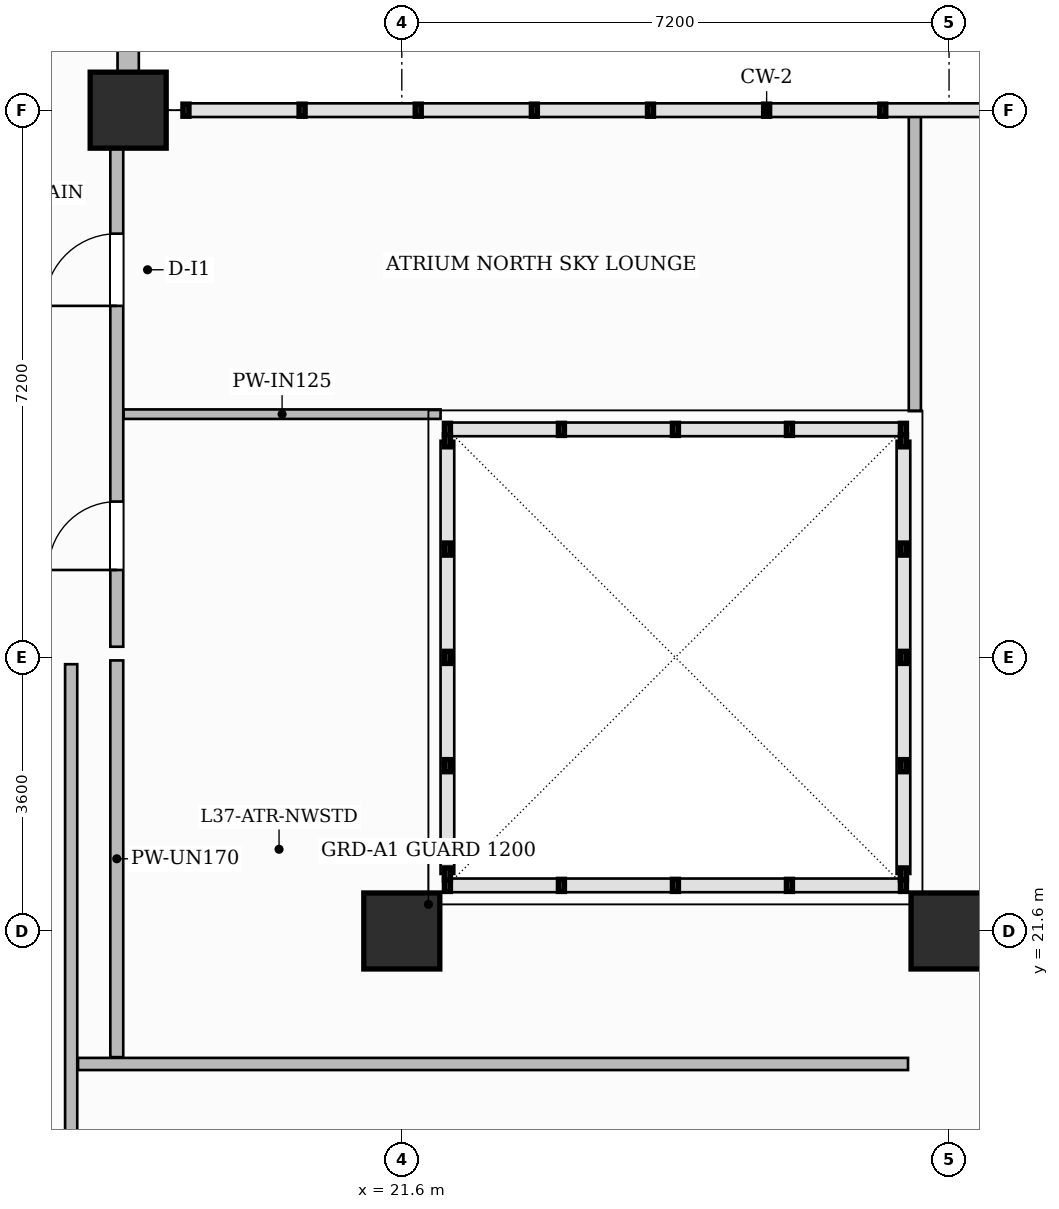
"""IFC4 building model, lengths in metres.
Left out: names, types, materials, properties, quantities, classifications, styles, units other than length and angle.
Written with IfcOpenShell. Run it as: python <this file> out.ifc"""

import sys

from ifc_helpers import new_model, si_unit, direction, frame, frame_2d, origin, origin_2d, place, context, subcontext, project, spatial, rectangle, extrude, source, transform, mapped, element, fill, save


model = new_model("IFC4")
c1 = context("Model", 3, precision=1e-05, world=origin(), true_north=direction((0.0, 1.0)))
c2 = subcontext(c1, "Body", "Model", "MODEL_VIEW")
j1 = project(units=[si_unit("LENGTHUNIT", "METRE"), si_unit("PLANEANGLEUNIT", "RADIAN")], contexts=[c1])
p1 = place(None, origin())
s1 = spatial("IfcSite", under=j1, at=p1, CompositionType="ELEMENT")
p2 = place(p1, origin())
s2 = spatial("IfcBuilding", under=s1, at=p2, CompositionType="ELEMENT")
p3 = place(p2, frame((0.0, 0.0, 150.3)))
s3 = spatial("IfcBuildingStorey", under=s2, at=p3, CompositionType="ELEMENT", Elevation=150.3)
m1 = source(origin(), c2, "Body", "SweptSolid", [
    extrude(rectangle(XDim=1.0, YDim=1.0, at=origin_2d()), origin(), (0.0, 0.0, 1.0), 3.85),
])
for number, where, z_axis, x_axis in (
    (1, (21.6, 21.6, 0.0), (0.0, 0.0, 1.0), (1.0, 0.0, 0.0)),
    (2, (28.8, 21.6, 0.0), (0.0, 0.0, 1.0), (1.0, 0.0, 0.0)),
    (3, (18.0, 32.4, 0.0), (0.0, 0.0, 1.0), (1.0, 0.0, 0.0)),
):
    element("IfcColumn", number, at=place(p3, frame(where, z_axis=z_axis, x_axis=x_axis)), inside=s3, PredefinedType="COLUMN", context=c2, shape_type="MappedRepresentation", body=[
        mapped(m1, transform((0.0, 0.0, 0.0), scale=1.0)),
    ])
p4 = place(p3, frame((17.25, 11.96, 0.0), z_axis=(0.0, 0.0, 1.0), x_axis=(0.0, 1.0, 0.0)))
e4 = element("IfcWall", 4, at=p4, inside=s3, PredefinedType="PARTITIONING", context=c2, shape_type="SweptSolid", body=[
    extrude(rectangle(XDim=13.15, YDim=0.16, at=frame_2d((6.575, 0.0))), origin(), (0.0, 0.0, 1.0), 3.6),
])
p5 = place(p3, frame((17.85, 19.94, 0.0), z_axis=(0.0, 0.0, 1.0), x_axis=(0.0, 1.0, 0.0)))
e5 = element("IfcWall", 5, at=p5, inside=s3, PredefinedType="PARTITIONING", context=c2, shape_type="SweptSolid", body=[
    extrude(rectangle(XDim=5.22, YDim=0.17, at=frame_2d((2.61, 0.0))), origin(), (0.0, 0.0, 1.0), 3.285),
])
p6 = place(p3, frame((17.85, 25.34, 0.0), z_axis=(0.0, 0.0, 1.0), x_axis=(0.0, 1.0, 0.0)))
e6 = element("IfcWall", 6, at=p6, inside=s3, PredefinedType="PARTITIONING", context=c2, shape_type="SweptSolid", body=[
    extrude(rectangle(XDim=6.87, YDim=0.17, at=frame_2d((3.435, 0.0))), origin(), (0.0, 0.0, 1.0), 3.6),
])
p7 = place(p6, frame((1.01, 0.0, 0.0)))
e7 = element("IfcOpeningElement", 7, at=p7, cuts=e6, PredefinedType="OPENING", context=c2, shape_type="SweptSolid", body=[
    extrude(rectangle(XDim=0.9, YDim=2.15, at=frame_2d((0.45, 1.075))), frame((0.0, 0.095, 0.0), z_axis=(0.0, -1.0, 0.0), x_axis=(1.0, 0.0, 0.0)), (0.0, 0.0, 1.0), 0.19),
])
p8 = place(p6, frame((4.485, 0.0, 0.0)))
e8 = element("IfcOpeningElement", 8, at=p8, cuts=e6, PredefinedType="OPENING", context=c2, shape_type="SweptSolid", body=[
    extrude(rectangle(XDim=0.95, YDim=2.15, at=frame_2d((0.475, 1.075))), frame((0.0, 0.095, 0.0), z_axis=(0.0, -1.0, 0.0), x_axis=(1.0, 0.0, 0.0)), (0.0, 0.0, 1.0), 0.19),
])
p9 = place(p3, frame((28.35, 28.44, 0.0), z_axis=(0.0, 0.0, 1.0), x_axis=(0.0, 1.0, 0.0)))
e9 = element("IfcWall", 9, at=p9, inside=s3, PredefinedType="PARTITIONING", context=c2, shape_type="SweptSolid", body=[
    extrude(rectangle(XDim=3.932, YDim=0.16, at=frame_2d((1.966, 0.0))), origin(), (0.0, 0.0, 1.0), 3.6),
])
p10 = place(p3, frame((17.94, 28.4, 0.0), z_axis=(0.0, 0.0, 1.0), x_axis=(1.0, 0.0, 0.0)))
e10 = element("IfcWall", 10, at=p10, inside=s3, PredefinedType="PARTITIONING", context=c2, shape_type="SweptSolid", body=[
    extrude(rectangle(XDim=4.17, YDim=0.125, at=frame_2d((2.085, 0.0))), origin(), (0.0, 0.0, 1.0), 3.6),
])
p11 = place(p3, frame((17.34, 19.85, 0.0), z_axis=(0.0, 0.0, 1.0), x_axis=(1.0, 0.0, 0.0)))
e11 = element("IfcWall", 11, at=p11, inside=s3, PredefinedType="PARTITIONING", context=c2, shape_type="SweptSolid", body=[
    extrude(rectangle(XDim=10.92, YDim=0.16, at=frame_2d((5.46, 0.0))), origin(), (0.0, 0.0, 1.0), 3.6),
])
p12 = place(p3, frame((18.0, 32.4, 0.0), z_axis=(0.0, 0.0, 1.0), x_axis=(0.0, 1.0, 0.0)))
e12 = element("IfcWall", 12, at=p12, inside=s3, PredefinedType="SOLIDWALL", context=c2, shape_type="SweptSolid", body=[
    extrude(rectangle(XDim=14.35, YDim=0.28, at=frame_2d((7.175, 0.0))), origin(), (0.0, 0.0, 1.0), 3.6),
])
p13 = place(p12, frame((1.5, 0.0, 0.0)))
e13 = element("IfcOpeningElement", 13, at=p13, cuts=e12, PredefinedType="OPENING", context=c2, shape_type="SweptSolid", body=[
    extrude(rectangle(XDim=1.2, YDim=2.2, at=frame_2d((0.6, 1.1))), frame((0.0, 0.15, 0.0), z_axis=(0.0, -1.0, 0.0), x_axis=(1.0, 0.0, 0.0)), (0.0, 0.0, 1.0), 0.3),
])
p14 = place(p12, frame((3.8, 0.0, 0.8)))
e14 = element("IfcOpeningElement", 14, at=p14, cuts=e12, PredefinedType="OPENING", context=c2, shape_type="SweptSolid", body=[
    extrude(rectangle(XDim=1.8, YDim=1.85, at=frame_2d((0.9, 0.925))), frame((0.0, 0.15, 0.0), z_axis=(0.0, -1.0, 0.0), x_axis=(1.0, 0.0, 0.0)), (0.0, 0.0, 1.0), 0.3),
])
p15 = place(p12, frame((8.525, 0.0, 0.8)))
e15 = element("IfcOpeningElement", 15, at=p15, cuts=e12, PredefinedType="OPENING", context=c2, shape_type="SweptSolid", body=[
    extrude(rectangle(XDim=1.8, YDim=1.85, at=frame_2d((0.9, 0.925))), frame((0.0, 0.15, 0.0), z_axis=(0.0, -1.0, 0.0), x_axis=(1.0, 0.0, 0.0)), (0.0, 0.0, 1.0), 0.3),
])
p16 = place(p12, frame((11.275, 0.0, 0.8)))
e16 = element("IfcOpeningElement", 16, at=p16, cuts=e12, PredefinedType="OPENING", context=c2, shape_type="SweptSolid", body=[
    extrude(rectangle(XDim=1.8, YDim=1.85, at=frame_2d((0.9, 0.925))), frame((0.0, 0.15, 0.0), z_axis=(0.0, -1.0, 0.0), x_axis=(1.0, 0.0, 0.0)), (0.0, 0.0, 1.0), 0.3),
])
m2 = source(origin(), c2, "Body", "SweptSolid", [
    extrude(rectangle(XDim=0.9, YDim=2.15, at=frame_2d((0.45, 1.075))), frame((0.0, 0.025, 0.0), z_axis=(0.0, -1.0, 0.0), x_axis=(1.0, 0.0, 0.0)), (0.0, 0.0, 1.0), 0.05),
])
p17 = place(p7, origin())
e17 = element("IfcDoor", 17, at=p17, inside=s3, OperationType="SINGLE_SWING_LEFT", PredefinedType="DOOR", context=c2, shape_type="MappedRepresentation", body=[
    mapped(m2, transform((0.0, 0.0, 0.0), scale=1.0)),
])
fill(e7, e17)
m3 = source(origin(), c2, "Body", "SweptSolid", [
    extrude(rectangle(XDim=0.95, YDim=2.15, at=frame_2d((0.475, 1.075))), frame((0.0, 0.025, 0.0), z_axis=(0.0, -1.0, 0.0), x_axis=(1.0, 0.0, 0.0)), (0.0, 0.0, 1.0), 0.05),
])
p18 = place(p8, origin())
e18 = element("IfcDoor", 18, at=p18, inside=s3, OperationType="SINGLE_SWING_LEFT", PredefinedType="DOOR", context=c2, shape_type="MappedRepresentation", body=[
    mapped(m3, transform((0.0, 0.0, 0.0), scale=1.0)),
])
fill(e8, e18)
save(model, sys.argv[1])
